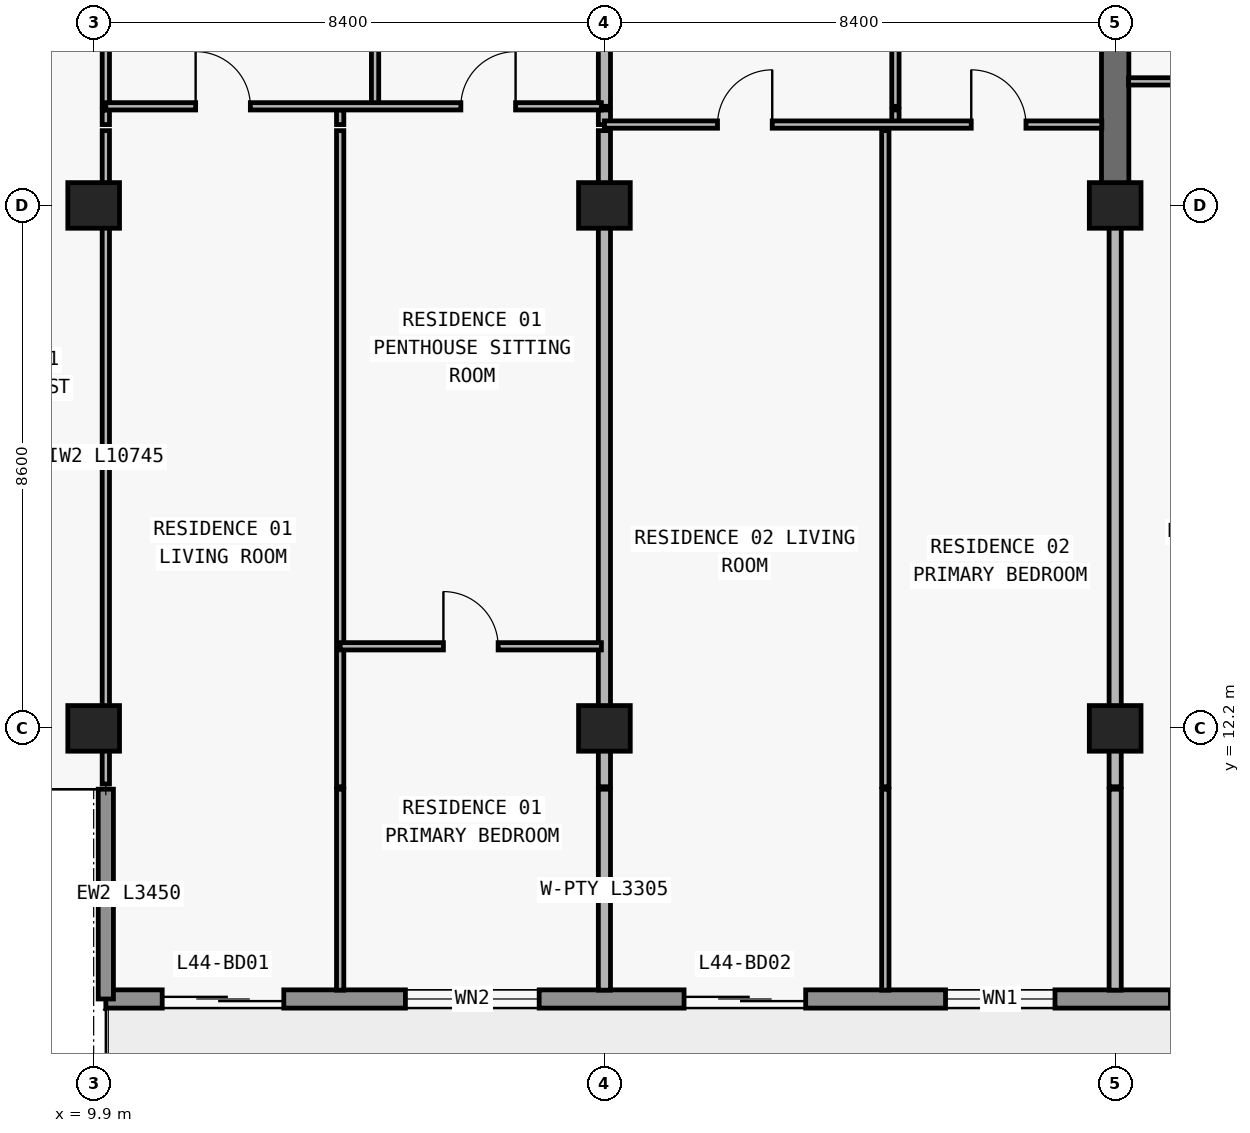
"""IFC4 building model, lengths in metres.
Left out: names, types, materials, properties, quantities, classifications, styles, units other than length and angle.
Written with IfcOpenShell. Run it as: python <this file> out.ifc"""

import sys

from ifc_helpers import new_model, si_unit, direction, frame, frame_2d, origin, origin_2d, place, context, subcontext, project, spatial, rectangle, extrude, element, fill, save


model = new_model("IFC4")
c1 = context("Model", 3, precision=1e-05, world=origin(), true_north=direction((0.0, 1.0)))
c2 = subcontext(c1, "Body", "Model", "MODEL_VIEW")
j1 = project(units=[si_unit("LENGTHUNIT", "METRE"), si_unit("PLANEANGLEUNIT", "RADIAN")], contexts=[c1])
p1 = place(None, origin())
s1 = spatial("IfcSite", under=j1, at=p1, CompositionType="ELEMENT")
p2 = place(p1, origin())
s2 = spatial("IfcBuilding", under=s1, at=p2, CompositionType="ELEMENT")
p3 = place(p2, frame((0.0, 0.0, 160.5)))
s3 = spatial("IfcBuildingStorey", under=s2, at=p3, CompositionType="ELEMENT", Elevation=160.5)
for number, where, z_axis, x_axis in (
    (1, (9.9, 12.2, 0.0), (0.0, 0.0, 1.0), (1.0, 0.0, 0.0)),
    (2, (18.3, 12.2, 0.0), (0.0, 0.0, 1.0), (1.0, 0.0, 0.0)),
    (3, (26.7, 12.2, 0.0), (0.0, 0.0, 1.0), (1.0, 0.0, 0.0)),
    (4, (9.9, 20.8, 0.0), (0.0, 0.0, 1.0), (1.0, 0.0, 0.0)),
    (5, (18.3, 20.8, 0.0), (0.0, 0.0, 1.0), (1.0, 0.0, 0.0)),
    (6, (26.7, 20.8, 0.0), (0.0, 0.0, 1.0), (1.0, 0.0, 0.0)),
):
    element("IfcColumn", number, at=place(p3, frame(where, z_axis=z_axis, x_axis=x_axis)), inside=s3, PredefinedType="COLUMN", context=c2, shape_type="SweptSolid", body=[
        extrude(rectangle(XDim=0.85, YDim=0.75, at=origin_2d()), origin(), (0.0, 0.0, 1.0), 3.05),
    ])
p4 = place(p3, frame((26.7, 20.8, 0.0), z_axis=(0.0, 0.0, 1.0), x_axis=(0.0, 1.0, 0.0)))
e7 = element("IfcWall", 7, at=p4, inside=s3, PredefinedType="SHEAR", context=c2, shape_type="SweptSolid", body=[
    extrude(rectangle(XDim=8.6, YDim=0.45, at=frame_2d((4.3, 0.0))), origin(), (0.0, 0.0, 1.0), 3.05),
])
p5 = place(p3, frame((67.7, 7.75, 0.0), z_axis=(0.0, 0.0, 1.0), x_axis=(-1.0, 0.0, 0.0)))
e8 = element("IfcWall", 8, at=p5, inside=s3, PredefinedType="STANDARD", context=c2, shape_type="SweptSolid", body=[
    extrude(rectangle(XDim=57.6, YDim=0.3, at=frame_2d((28.8, 0.0))), origin(), (0.0, 0.0, 1.0), 3.05),
])
p6 = place(p5, frame((54.673, 0.0, 0.0)))
e9 = element("IfcOpeningElement", 9, at=p6, cuts=e8, PredefinedType="OPENING", context=c2, shape_type="SweptSolid", body=[
    extrude(rectangle(XDim=2.0, YDim=2.3, at=frame_2d((1.0, 1.15))), frame((0.0, 0.16, 0.0), z_axis=(0.0, -1.0, 0.0), x_axis=(1.0, 0.0, 0.0)), (0.0, 0.0, 1.0), 0.32),
])
p7 = place(p5, frame((50.473, 0.0, 0.85)))
e10 = element("IfcOpeningElement", 10, at=p7, cuts=e8, PredefinedType="OPENING", context=c2, shape_type="SweptSolid", body=[
    extrude(rectangle(XDim=2.2, YDim=1.55, at=frame_2d((1.1, 0.775))), frame((0.0, 0.16, 0.0), z_axis=(0.0, -1.0, 0.0), x_axis=(1.0, 0.0, 0.0)), (0.0, 0.0, 1.0), 0.32),
])
p8 = place(p5, frame((46.09, 0.0, 0.0)))
e11 = element("IfcOpeningElement", 11, at=p8, cuts=e8, PredefinedType="OPENING", context=c2, shape_type="SweptSolid", body=[
    extrude(rectangle(XDim=2.0, YDim=2.3, at=frame_2d((1.0, 1.15))), frame((0.0, 0.16, 0.0), z_axis=(0.0, -1.0, 0.0), x_axis=(1.0, 0.0, 0.0)), (0.0, 0.0, 1.0), 0.32),
])
p9 = place(p5, frame((41.99, 0.0, 0.85)))
e12 = element("IfcOpeningElement", 12, at=p9, cuts=e8, PredefinedType="OPENING", context=c2, shape_type="SweptSolid", body=[
    extrude(rectangle(XDim=1.8, YDim=1.55, at=frame_2d((0.9, 0.775))), frame((0.0, 0.16, 0.0), z_axis=(0.0, -1.0, 0.0), x_axis=(1.0, 0.0, 0.0)), (0.0, 0.0, 1.0), 0.32),
])
p10 = place(p5, frame((38.09, 0.0, 0.0)))
e13 = element("IfcOpeningElement", 13, at=p10, cuts=e8, PredefinedType="OPENING", context=c2, shape_type="SweptSolid", body=[
    extrude(rectangle(XDim=2.0, YDim=2.3, at=frame_2d((1.0, 1.15))), frame((0.0, 0.16, 0.0), z_axis=(0.0, -1.0, 0.0), x_axis=(1.0, 0.0, 0.0)), (0.0, 0.0, 1.0), 0.32),
])
p11 = place(p5, frame((33.41, 0.0, 0.65)))
e14 = element("IfcOpeningElement", 14, at=p11, cuts=e8, PredefinedType="OPENING", context=c2, shape_type="SweptSolid", body=[
    extrude(rectangle(XDim=2.6, YDim=1.85, at=frame_2d((1.3, 0.925))), frame((0.0, 0.16, 0.0), z_axis=(0.0, -1.0, 0.0), x_axis=(1.0, 0.0, 0.0)), (0.0, 0.0, 1.0), 0.32),
])
p12 = place(p5, frame((27.7, 0.0, 0.85)))
e15 = element("IfcOpeningElement", 15, at=p12, cuts=e8, PredefinedType="OPENING", context=c2, shape_type="SweptSolid", body=[
    extrude(rectangle(XDim=2.2, YDim=1.55, at=frame_2d((1.1, 0.775))), frame((0.0, 0.16, 0.0), z_axis=(0.0, -1.0, 0.0), x_axis=(1.0, 0.0, 0.0)), (0.0, 0.0, 1.0), 0.32),
])
p13 = place(p5, frame((21.69, 0.0, 0.0)))
e16 = element("IfcOpeningElement", 16, at=p13, cuts=e8, PredefinedType="OPENING", context=c2, shape_type="SweptSolid", body=[
    extrude(rectangle(XDim=2.0, YDim=2.3, at=frame_2d((1.0, 1.15))), frame((0.0, 0.16, 0.0), z_axis=(0.0, -1.0, 0.0), x_axis=(1.0, 0.0, 0.0)), (0.0, 0.0, 1.0), 0.32),
])
p14 = place(p5, frame((17.59, 0.0, 0.85)))
e17 = element("IfcOpeningElement", 17, at=p14, cuts=e8, PredefinedType="OPENING", context=c2, shape_type="SweptSolid", body=[
    extrude(rectangle(XDim=1.8, YDim=1.55, at=frame_2d((0.9, 0.775))), frame((0.0, 0.16, 0.0), z_axis=(0.0, -1.0, 0.0), x_axis=(1.0, 0.0, 0.0)), (0.0, 0.0, 1.0), 0.32),
])
p15 = place(p5, frame((13.626, 0.0, 0.0)))
e18 = element("IfcOpeningElement", 18, at=p15, cuts=e8, PredefinedType="OPENING", context=c2, shape_type="SweptSolid", body=[
    extrude(rectangle(XDim=2.0, YDim=2.3, at=frame_2d((1.0, 1.15))), frame((0.0, 0.16, 0.0), z_axis=(0.0, -1.0, 0.0), x_axis=(1.0, 0.0, 0.0)), (0.0, 0.0, 1.0), 0.32),
])
p16 = place(p5, frame((9.326, 0.0, 0.85)))
e19 = element("IfcOpeningElement", 19, at=p16, cuts=e8, PredefinedType="OPENING", context=c2, shape_type="SweptSolid", body=[
    extrude(rectangle(XDim=2.2, YDim=1.55, at=frame_2d((1.1, 0.775))), frame((0.0, 0.16, 0.0), z_axis=(0.0, -1.0, 0.0), x_axis=(1.0, 0.0, 0.0)), (0.0, 0.0, 1.0), 0.32),
])
p17 = place(p5, frame((4.945, 0.0, 0.0)))
e20 = element("IfcOpeningElement", 20, at=p17, cuts=e8, PredefinedType="OPENING", context=c2, shape_type="SweptSolid", body=[
    extrude(rectangle(XDim=2.0, YDim=2.3, at=frame_2d((1.0, 1.15))), frame((0.0, 0.16, 0.0), z_axis=(0.0, -1.0, 0.0), x_axis=(1.0, 0.0, 0.0)), (0.0, 0.0, 1.0), 0.32),
])
p18 = place(p5, frame((0.945, 0.0, 0.85)))
e21 = element("IfcOpeningElement", 21, at=p18, cuts=e8, PredefinedType="OPENING", context=c2, shape_type="SweptSolid", body=[
    extrude(rectangle(XDim=1.8, YDim=1.55, at=frame_2d((0.9, 0.775))), frame((0.0, 0.16, 0.0), z_axis=(0.0, -1.0, 0.0), x_axis=(1.0, 0.0, 0.0)), (0.0, 0.0, 1.0), 0.32),
])
p19 = place(p3, frame((10.1, 11.2, 0.0), z_axis=(0.0, 0.0, 1.0), x_axis=(0.0, -1.0, 0.0)))
e22 = element("IfcWall", 22, at=p19, inside=s3, PredefinedType="ELEMENTEDWALL", context=c2, shape_type="SweptSolid", body=[
    extrude(rectangle(XDim=3.45, YDim=0.25, at=frame_2d((1.725, 0.0))), origin(), (0.0, 0.0, 1.0), 3.05),
])
p20 = place(p3, frame((10.1, 11.285, 0.0), z_axis=(0.0, 0.0, 1.0), x_axis=(0.0, 1.0, 0.0)))
e23 = element("IfcWall", 23, at=p20, inside=s3, PredefinedType="PARTITIONING", context=c2, shape_type="SweptSolid", body=[
    extrude(rectangle(XDim=10.745, YDim=0.12, at=frame_2d((5.373, 0.0))), origin(), (0.0, 0.0, 1.0), 2.263),
])
p21 = place(p3, frame((10.1, 22.13, 0.0), z_axis=(0.0, 0.0, 1.0), x_axis=(0.0, 1.0, 0.0)))
e24 = element("IfcWall", 24, at=p21, inside=s3, PredefinedType="PARTITIONING", context=c2, shape_type="SweptSolid", body=[
    extrude(rectangle(XDim=0.24, YDim=0.12, at=frame_2d((0.12, 0.0))), origin(), (0.0, 0.0, 1.0), 2.263),
])
p22 = place(p3, frame((10.1, 22.43, 0.0), z_axis=(0.0, 0.0, 1.0), x_axis=(0.0, 1.0, 0.0)))
e25 = element("IfcWall", 25, at=p22, inside=s3, PredefinedType="PARTITIONING", context=c2, shape_type="SweptSolid", body=[
    extrude(rectangle(XDim=4.75, YDim=0.12, at=frame_2d((2.375, 0.0))), origin(), (0.0, 0.0, 1.0), 2.263),
])
p23 = place(p22, frame((1.925, 0.0, 0.0)))
e26 = element("IfcOpeningElement", 26, at=p23, cuts=e25, PredefinedType="OPENING", context=c2, shape_type="SweptSolid", body=[
    extrude(rectangle(XDim=0.9, YDim=2.15, at=frame_2d((0.45, 1.075))), frame((0.0, 0.07, 0.0), z_axis=(0.0, -1.0, 0.0), x_axis=(1.0, 0.0, 0.0)), (0.0, 0.0, 1.0), 0.14),
])
p24 = place(p3, frame((13.954, 7.895, 0.0), z_axis=(0.0, 0.0, 1.0), x_axis=(0.0, 1.0, 0.0)))
e27 = element("IfcWall", 27, at=p24, inside=s3, PredefinedType="PARTITIONING", context=c2, shape_type="SweptSolid", body=[
    extrude(rectangle(XDim=3.305, YDim=0.12, at=frame_2d((1.652, 0.0))), origin(), (0.0, 0.0, 1.0), 3.05),
])
p25 = place(p3, frame((13.954, 11.24, 0.0), z_axis=(0.0, 0.0, 1.0), x_axis=(0.0, 1.0, 0.0)))
e28 = element("IfcWall", 28, at=p25, inside=s3, PredefinedType="PARTITIONING", context=c2, shape_type="SweptSolid", body=[
    extrude(rectangle(XDim=10.79, YDim=0.12, at=frame_2d((5.395, 0.0))), origin(), (0.0, 0.0, 1.0), 3.05),
])
p26 = place(p3, frame((13.954, 22.13, 0.0), z_axis=(0.0, 0.0, 1.0), x_axis=(0.0, 1.0, 0.0)))
e29 = element("IfcWall", 29, at=p26, inside=s3, PredefinedType="PARTITIONING", context=c2, shape_type="SweptSolid", body=[
    extrude(rectangle(XDim=0.24, YDim=0.12, at=frame_2d((0.12, 0.0))), origin(), (0.0, 0.0, 1.0), 3.05),
])
p27 = place(p3, frame((14.528, 22.43, 0.0), z_axis=(0.0, 0.0, 1.0), x_axis=(0.0, 1.0, 0.0)))
e30 = element("IfcWall", 30, at=p27, inside=s3, PredefinedType="PARTITIONING", context=c2, shape_type="SweptSolid", body=[
    extrude(rectangle(XDim=4.75, YDim=0.12, at=frame_2d((2.375, 0.0))), origin(), (0.0, 0.0, 1.0), 3.05),
])
p28 = place(p27, frame((1.925, 0.0, 0.0)))
e31 = element("IfcOpeningElement", 31, at=p28, cuts=e30, PredefinedType="OPENING", context=c2, shape_type="SweptSolid", body=[
    extrude(rectangle(XDim=0.9, YDim=2.15, at=frame_2d((0.45, 1.075))), frame((0.0, 0.07, 0.0), z_axis=(0.0, -1.0, 0.0), x_axis=(1.0, 0.0, 0.0)), (0.0, 0.0, 1.0), 0.14),
])
p29 = place(p3, frame((18.3, 7.895, 0.0), z_axis=(0.0, 0.0, 1.0), x_axis=(0.0, 1.0, 0.0)))
e32 = element("IfcWall", 32, at=p29, inside=s3, PredefinedType="PARTITIONING", context=c2, shape_type="SweptSolid", body=[
    extrude(rectangle(XDim=3.305, YDim=0.2, at=frame_2d((1.652, 0.0))), origin(), (0.0, 0.0, 1.0), 3.05),
])
p30 = place(p3, frame((18.3, 11.24, 0.0), z_axis=(0.0, 0.0, 1.0), x_axis=(0.0, 1.0, 0.0)))
e33 = element("IfcWall", 33, at=p30, inside=s3, PredefinedType="PARTITIONING", context=c2, shape_type="SweptSolid", body=[
    extrude(rectangle(XDim=10.79, YDim=0.2, at=frame_2d((5.395, 0.0))), origin(), (0.0, 0.0, 1.0), 2.263),
])
p31 = place(p3, frame((18.3, 22.13, 0.0), z_axis=(0.0, 0.0, 1.0), x_axis=(0.0, 1.0, 0.0)))
e34 = element("IfcWall", 34, at=p31, inside=s3, PredefinedType="PARTITIONING", context=c2, shape_type="SweptSolid", body=[
    extrude(rectangle(XDim=0.24, YDim=0.2, at=frame_2d((0.12, 0.0))), origin(), (0.0, 0.0, 1.0), 2.263),
])
p32 = place(p3, frame((18.3, 22.43, 0.0), z_axis=(0.0, 0.0, 1.0), x_axis=(0.0, 1.0, 0.0)))
e35 = element("IfcWall", 35, at=p32, inside=s3, PredefinedType="PARTITIONING", context=c2, shape_type="SweptSolid", body=[
    extrude(rectangle(XDim=4.75, YDim=0.2, at=frame_2d((2.375, 0.0))), origin(), (0.0, 0.0, 1.0), 2.263),
])
p33 = place(p3, frame((22.92, 7.895, 0.0), z_axis=(0.0, 0.0, 1.0), x_axis=(0.0, 1.0, 0.0)))
e36 = element("IfcWall", 36, at=p33, inside=s3, PredefinedType="PARTITIONING", context=c2, shape_type="SweptSolid", body=[
    extrude(rectangle(XDim=3.305, YDim=0.12, at=frame_2d((1.652, 0.0))), origin(), (0.0, 0.0, 1.0), 3.05),
])
p34 = place(p3, frame((22.92, 11.24, 0.0), z_axis=(0.0, 0.0, 1.0), x_axis=(0.0, 1.0, 0.0)))
e37 = element("IfcWall", 37, at=p34, inside=s3, PredefinedType="PARTITIONING", context=c2, shape_type="SweptSolid", body=[
    extrude(rectangle(XDim=10.79, YDim=0.12, at=frame_2d((5.395, 0.0))), origin(), (0.0, 0.0, 1.0), 3.05),
])
p35 = place(p3, frame((23.086, 22.13, 0.0), z_axis=(0.0, 0.0, 1.0), x_axis=(0.0, 1.0, 0.0)))
e38 = element("IfcWall", 38, at=p35, inside=s3, PredefinedType="PARTITIONING", context=c2, shape_type="SweptSolid", body=[
    extrude(rectangle(XDim=0.24, YDim=0.12, at=frame_2d((0.12, 0.0))), origin(), (0.0, 0.0, 1.0), 3.05),
])
p36 = place(p3, frame((23.086, 22.43, 0.0), z_axis=(0.0, 0.0, 1.0), x_axis=(0.0, 1.0, 0.0)))
e39 = element("IfcWall", 39, at=p36, inside=s3, PredefinedType="PARTITIONING", context=c2, shape_type="SweptSolid", body=[
    extrude(rectangle(XDim=4.75, YDim=0.12, at=frame_2d((2.375, 0.0))), origin(), (0.0, 0.0, 1.0), 3.05),
])
p37 = place(p36, frame((1.925, 0.0, 0.0)))
e40 = element("IfcOpeningElement", 40, at=p37, cuts=e39, PredefinedType="OPENING", context=c2, shape_type="SweptSolid", body=[
    extrude(rectangle(XDim=0.9, YDim=2.15, at=frame_2d((0.45, 1.075))), frame((0.0, 0.07, 0.0), z_axis=(0.0, -1.0, 0.0), x_axis=(1.0, 0.0, 0.0)), (0.0, 0.0, 1.0), 0.14),
])
p38 = place(p3, frame((26.7, 7.895, 0.0), z_axis=(0.0, 0.0, 1.0), x_axis=(0.0, 1.0, 0.0)))
e41 = element("IfcWall", 41, at=p38, inside=s3, PredefinedType="PARTITIONING", context=c2, shape_type="SweptSolid", body=[
    extrude(rectangle(XDim=3.305, YDim=0.2, at=frame_2d((1.652, 0.0))), origin(), (0.0, 0.0, 1.0), 3.05),
])
p39 = place(p3, frame((26.7, 11.24, 0.0), z_axis=(0.0, 0.0, 1.0), x_axis=(0.0, 1.0, 0.0)))
e42 = element("IfcWall", 42, at=p39, inside=s3, PredefinedType="PARTITIONING", context=c2, shape_type="SweptSolid", body=[
    extrude(rectangle(XDim=9.555, YDim=0.2, at=frame_2d((4.777, 0.0))), origin(), (0.0, 0.0, 1.0), 2.263),
])
p40 = place(p3, frame((13.954, 13.55, 0.0), z_axis=(0.0, 0.0, 1.0), x_axis=(1.0, 0.0, 0.0)))
e43 = element("IfcWall", 43, at=p40, inside=s3, PredefinedType="PARTITIONING", context=c2, shape_type="SweptSolid", body=[
    extrude(rectangle(XDim=4.296, YDim=0.12, at=frame_2d((2.148, 0.0))), origin(), (0.0, 0.0, 1.0), 3.05),
])
p41 = place(p40, frame((1.698, 0.0, 0.0)))
e44 = element("IfcOpeningElement", 44, at=p41, cuts=e43, PredefinedType="OPENING", context=c2, shape_type="SweptSolid", body=[
    extrude(rectangle(XDim=0.9, YDim=2.15, at=frame_2d((0.45, 1.075))), frame((0.0, 0.07, 0.0), z_axis=(0.0, -1.0, 0.0), x_axis=(1.0, 0.0, 0.0)), (0.0, 0.0, 1.0), 0.14),
])
p42 = place(p3, frame((18.3, 22.13, 0.0), z_axis=(0.0, 0.0, 1.0), x_axis=(1.0, 0.0, 0.0)))
e45 = element("IfcWall", 45, at=p42, inside=s3, PredefinedType="PARTITIONING", context=c2, shape_type="SweptSolid", body=[
    extrude(rectangle(XDim=8.18, YDim=0.12, at=frame_2d((4.09, 0.0))), origin(), (0.0, 0.0, 1.0), 3.05),
])
p43 = place(p42, frame((1.86, 0.0, 0.0)))
e46 = element("IfcOpeningElement", 46, at=p43, cuts=e45, PredefinedType="OPENING", context=c2, shape_type="SweptSolid", body=[
    extrude(rectangle(XDim=0.9, YDim=2.15, at=frame_2d((0.45, 1.075))), frame((0.0, 0.07, 0.0), z_axis=(0.0, -1.0, 0.0), x_axis=(1.0, 0.0, 0.0)), (0.0, 0.0, 1.0), 0.14),
])
p44 = place(p42, frame((6.033, 0.0, 0.0)))
e47 = element("IfcOpeningElement", 47, at=p44, cuts=e45, PredefinedType="OPENING", context=c2, shape_type="SweptSolid", body=[
    extrude(rectangle(XDim=0.9, YDim=2.15, at=frame_2d((0.45, 1.075))), frame((0.0, 0.07, 0.0), z_axis=(0.0, -1.0, 0.0), x_axis=(1.0, 0.0, 0.0)), (0.0, 0.0, 1.0), 0.14),
])
p45 = place(p3, frame((10.1, 22.43, 0.0), z_axis=(0.0, 0.0, 1.0), x_axis=(1.0, 0.0, 0.0)))
e48 = element("IfcWall", 48, at=p45, inside=s3, PredefinedType="PARTITIONING", context=c2, shape_type="SweptSolid", body=[
    extrude(rectangle(XDim=8.15, YDim=0.12, at=frame_2d((4.075, 0.0))), origin(), (0.0, 0.0, 1.0), 3.05),
])
p46 = place(p45, frame((1.477, 0.0, 0.0)))
e49 = element("IfcOpeningElement", 49, at=p46, cuts=e48, PredefinedType="OPENING", context=c2, shape_type="SweptSolid", body=[
    extrude(rectangle(XDim=0.9, YDim=2.15, at=frame_2d((0.45, 1.075))), frame((0.0, 0.07, 0.0), z_axis=(0.0, -1.0, 0.0), x_axis=(1.0, 0.0, 0.0)), (0.0, 0.0, 1.0), 0.14),
])
p47 = place(p45, frame((5.839, 0.0, 0.0)))
e50 = element("IfcOpeningElement", 50, at=p47, cuts=e48, PredefinedType="OPENING", context=c2, shape_type="SweptSolid", body=[
    extrude(rectangle(XDim=0.9, YDim=2.15, at=frame_2d((0.45, 1.075))), frame((0.0, 0.07, 0.0), z_axis=(0.0, -1.0, 0.0), x_axis=(1.0, 0.0, 0.0)), (0.0, 0.0, 1.0), 0.14),
])
p48 = place(p3, frame((26.92, 22.84, 0.0), z_axis=(0.0, 0.0, 1.0), x_axis=(1.0, 0.0, 0.0)))
e51 = element("IfcWall", 51, at=p48, inside=s3, PredefinedType="PARTITIONING", context=c2, shape_type="SweptSolid", body=[
    extrude(rectangle(XDim=8.18, YDim=0.12, at=frame_2d((4.09, 0.0))), origin(), (0.0, 0.0, 1.0), 3.05),
])
p49 = place(p48, frame((1.33, 0.0, 0.0)))
e52 = element("IfcOpeningElement", 52, at=p49, cuts=e51, PredefinedType="OPENING", context=c2, shape_type="SweptSolid", body=[
    extrude(rectangle(XDim=0.9, YDim=2.15, at=frame_2d((0.45, 1.075))), frame((0.0, 0.07, 0.0), z_axis=(0.0, -1.0, 0.0), x_axis=(1.0, 0.0, 0.0)), (0.0, 0.0, 1.0), 0.14),
])
p50 = place(p6, origin())
e53 = element("IfcDoor", 53, at=p50, inside=s3, OperationType="DOUBLE_DOOR_SLIDING", PredefinedType="DOOR", context=c2, shape_type="SweptSolid", body=[
    extrude(rectangle(XDim=2.0, YDim=2.3, at=frame_2d((1.0, 1.15))), frame((0.0, 0.025, 0.0), z_axis=(0.0, -1.0, 0.0), x_axis=(1.0, 0.0, 0.0)), (0.0, 0.0, 1.0), 0.05),
])
fill(e9, e53)
p51 = place(p7, origin())
e54 = element("IfcWindow", 54, at=p51, inside=s3, PartitioningType="SINGLE_PANEL", PredefinedType="WINDOW", context=c2, shape_type="SweptSolid", body=[
    extrude(rectangle(XDim=2.2, YDim=1.55, at=frame_2d((1.1, 0.775))), frame((0.0, 0.03, 0.0), z_axis=(0.0, -1.0, 0.0), x_axis=(1.0, 0.0, 0.0)), (0.0, 0.0, 1.0), 0.06),
])
fill(e10, e54)
p52 = place(p8, origin())
e55 = element("IfcDoor", 55, at=p52, inside=s3, OperationType="DOUBLE_DOOR_SLIDING", PredefinedType="DOOR", context=c2, shape_type="SweptSolid", body=[
    extrude(rectangle(XDim=2.0, YDim=2.3, at=frame_2d((1.0, 1.15))), frame((0.0, 0.025, 0.0), z_axis=(0.0, -1.0, 0.0), x_axis=(1.0, 0.0, 0.0)), (0.0, 0.0, 1.0), 0.05),
])
fill(e11, e55)
p53 = place(p9, origin())
e56 = element("IfcWindow", 56, at=p53, inside=s3, PartitioningType="SINGLE_PANEL", PredefinedType="WINDOW", context=c2, shape_type="SweptSolid", body=[
    extrude(rectangle(XDim=1.8, YDim=1.55, at=frame_2d((0.9, 0.775))), frame((0.0, 0.03, 0.0), z_axis=(0.0, -1.0, 0.0), x_axis=(1.0, 0.0, 0.0)), (0.0, 0.0, 1.0), 0.06),
])
fill(e12, e56)
p54 = place(p46, origin())
e57 = element("IfcDoor", 57, at=p54, inside=s3, OperationType="SINGLE_SWING_LEFT", PredefinedType="DOOR", context=c2, shape_type="SweptSolid", body=[
    extrude(rectangle(XDim=0.9, YDim=2.15, at=frame_2d((0.45, 1.075))), frame((0.0, 0.025, 0.0), z_axis=(0.0, -1.0, 0.0), x_axis=(1.0, 0.0, 0.0)), (0.0, 0.0, 1.0), 0.05),
])
fill(e49, e57)
p55 = place(p47, origin())
e58 = element("IfcDoor", 58, at=p55, inside=s3, OperationType="SINGLE_SWING_RIGHT", PredefinedType="DOOR", context=c2, shape_type="SweptSolid", body=[
    extrude(rectangle(XDim=0.9, YDim=2.15, at=frame_2d((0.45, 1.075))), frame((0.0, 0.025, 0.0), z_axis=(0.0, -1.0, 0.0), x_axis=(1.0, 0.0, 0.0)), (0.0, 0.0, 1.0), 0.05),
])
fill(e50, e58)
p56 = place(p41, origin())
e59 = element("IfcDoor", 59, at=p56, inside=s3, OperationType="SINGLE_SWING_LEFT", PredefinedType="DOOR", context=c2, shape_type="SweptSolid", body=[
    extrude(rectangle(XDim=0.9, YDim=2.15, at=frame_2d((0.45, 1.075))), frame((0.0, 0.025, 0.0), z_axis=(0.0, -1.0, 0.0), x_axis=(1.0, 0.0, 0.0)), (0.0, 0.0, 1.0), 0.05),
])
fill(e44, e59)
p57 = place(p43, origin())
e60 = element("IfcDoor", 60, at=p57, inside=s3, OperationType="SINGLE_SWING_RIGHT", PredefinedType="DOOR", context=c2, shape_type="SweptSolid", body=[
    extrude(rectangle(XDim=0.9, YDim=2.15, at=frame_2d((0.45, 1.075))), frame((0.0, 0.025, 0.0), z_axis=(0.0, -1.0, 0.0), x_axis=(1.0, 0.0, 0.0)), (0.0, 0.0, 1.0), 0.05),
])
fill(e46, e60)
p58 = place(p44, origin())
e61 = element("IfcDoor", 61, at=p58, inside=s3, OperationType="SINGLE_SWING_LEFT", PredefinedType="DOOR", context=c2, shape_type="SweptSolid", body=[
    extrude(rectangle(XDim=0.9, YDim=2.15, at=frame_2d((0.45, 1.075))), frame((0.0, 0.025, 0.0), z_axis=(0.0, -1.0, 0.0), x_axis=(1.0, 0.0, 0.0)), (0.0, 0.0, 1.0), 0.05),
])
fill(e47, e61)
save(model, sys.argv[1])
